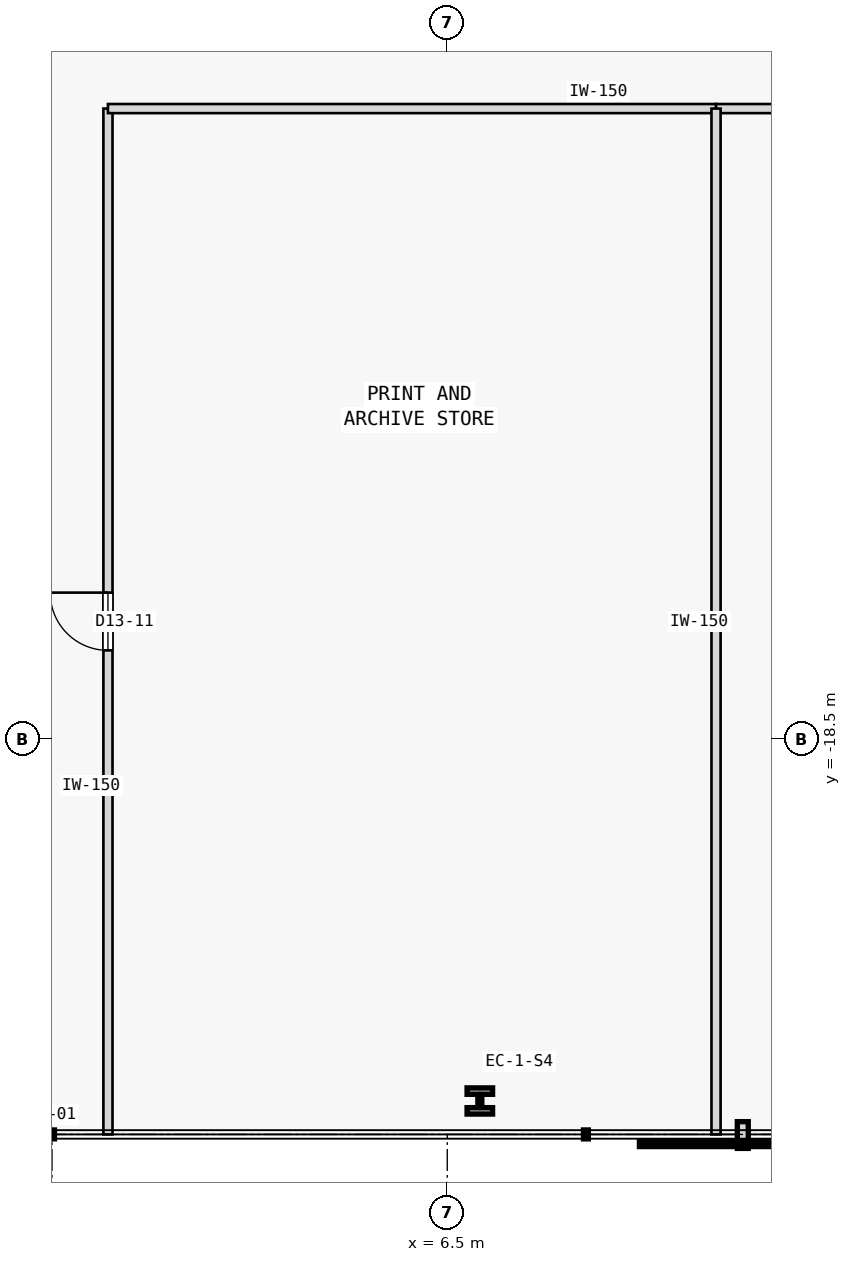
"""IFC4 building model, lengths in metres.
Left out: names, types, materials, properties, quantities, classifications, styles, units other than length and angle.
Written with IfcOpenShell. Run it as: python <this file> out.ifc"""

import sys

from ifc_helpers import new_model, si_unit, direction, frame, frame_2d, origin, origin_2d, place, context, subcontext, project, spatial, rectangle, i_section, extrude, element, fill, save


model = new_model("IFC4")
c1 = context("Model", 3, precision=1e-05, world=origin(), true_north=direction((0.0, 1.0)))
c2 = subcontext(c1, "Body", "Model", "MODEL_VIEW")
j1 = project(units=[si_unit("LENGTHUNIT", "METRE"), si_unit("PLANEANGLEUNIT", "RADIAN")], contexts=[c1])
p1 = place(None, origin())
s1 = spatial("IfcSite", under=j1, at=p1, CompositionType="ELEMENT")
p2 = place(p1, origin())
s2 = spatial("IfcBuilding", under=s1, at=p2, CompositionType="ELEMENT")
p3 = place(p2, frame((0.0, 0.0, 56.0)))
s3 = spatial("IfcBuildingStorey", under=s2, at=p3, CompositionType="ELEMENT", Elevation=56.0)
p4 = place(p3, frame((7.036, -24.45, 0.0), z_axis=(0.0, 0.0, 1.0), x_axis=(1.0, 0.0, 0.0)))
e1 = element("IfcColumn", 1, at=p4, inside=s3, PredefinedType="COLUMN", context=c2, shape_type="SweptSolid", body=[
    extrude(i_section(OverallWidth=0.42, OverallDepth=0.431, WebThickness=0.065, FlangeThickness=0.106, FilletRadius=0.015, at=origin_2d()), origin(), (0.0, 0.0, 1.0), 3.8),
])
p5 = place(p3, frame((0.92, -25.0, 0.0), z_axis=(0.0, 0.0, 1.0), x_axis=(0.0, 1.0, 0.0)))
e2 = element("IfcWall", 2, at=p5, inside=s3, PredefinedType="PARTITIONING", context=c2, shape_type="SweptSolid", body=[
    extrude(rectangle(XDim=16.87, YDim=0.15, at=frame_2d((8.435, 0.0))), origin(), (0.0, 0.0, 1.0), 3.575),
])
p6 = place(p5, frame((7.96, 0.0, 0.0)))
e3 = element("IfcOpeningElement", 3, at=p6, cuts=e2, PredefinedType="OPENING", context=c2, shape_type="SweptSolid", body=[
    extrude(rectangle(XDim=0.95, YDim=2.15, at=frame_2d((0.475, 1.075))), frame((0.0, 0.085, 0.0), z_axis=(0.0, -1.0, 0.0), x_axis=(1.0, 0.0, 0.0)), (0.0, 0.0, 1.0), 0.17),
])
p7 = place(p3, frame((0.92, -8.13, 0.0), z_axis=(0.0, 0.0, 1.0), x_axis=(1.0, 0.0, 0.0)))
e4 = element("IfcWall", 4, at=p7, inside=s3, PredefinedType="PARTITIONING", context=c2, shape_type="SweptSolid", body=[
    extrude(rectangle(XDim=10.0, YDim=0.15, at=frame_2d((5.0, 0.0))), origin(), (0.0, 0.0, 1.0), 3.575),
])
p8 = place(p3, frame((10.92, -8.13, 0.0), z_axis=(0.0, 0.0, 1.0), x_axis=(1.0, 0.0, 0.0)))
e5 = element("IfcWall", 5, at=p8, inside=s3, PredefinedType="PARTITIONING", context=c2, shape_type="SweptSolid", body=[
    extrude(rectangle(XDim=6.139, YDim=0.15, at=frame_2d((3.07, 0.0))), origin(), (0.0, 0.0, 1.0), 3.575),
])
p9 = place(p8, frame((2.594, 0.0, 0.0)))
e6 = element("IfcOpeningElement", 6, at=p9, cuts=e5, PredefinedType="OPENING", context=c2, shape_type="SweptSolid", body=[
    extrude(rectangle(XDim=0.95, YDim=2.15, at=frame_2d((0.475, 1.075))), frame((0.0, 0.085, 0.0), z_axis=(0.0, -1.0, 0.0), x_axis=(1.0, 0.0, 0.0)), (0.0, 0.0, 1.0), 0.17),
])
p10 = place(p3, frame((10.92, -25.0, 0.0), z_axis=(0.0, 0.0, 1.0), x_axis=(0.0, 1.0, 0.0)))
e7 = element("IfcWall", 7, at=p10, inside=s3, PredefinedType="PARTITIONING", context=c2, shape_type="SweptSolid", body=[
    extrude(rectangle(XDim=16.87, YDim=0.15, at=frame_2d((8.435, 0.0))), origin(), (0.0, 0.0, 1.0), 3.575),
])
p11 = place(p6, origin())
e8 = element("IfcDoor", 8, at=p11, inside=s3, OperationType="SINGLE_SWING_RIGHT", PredefinedType="DOOR", context=c2, shape_type="SweptSolid", body=[
    extrude(rectangle(XDim=0.95, YDim=2.15, at=frame_2d((0.475, 1.075))), frame((0.0, 0.025, 0.0), z_axis=(0.0, -1.0, 0.0), x_axis=(1.0, 0.0, 0.0)), (0.0, 0.0, 1.0), 0.05),
])
fill(e3, e8)
save(model, sys.argv[1])
